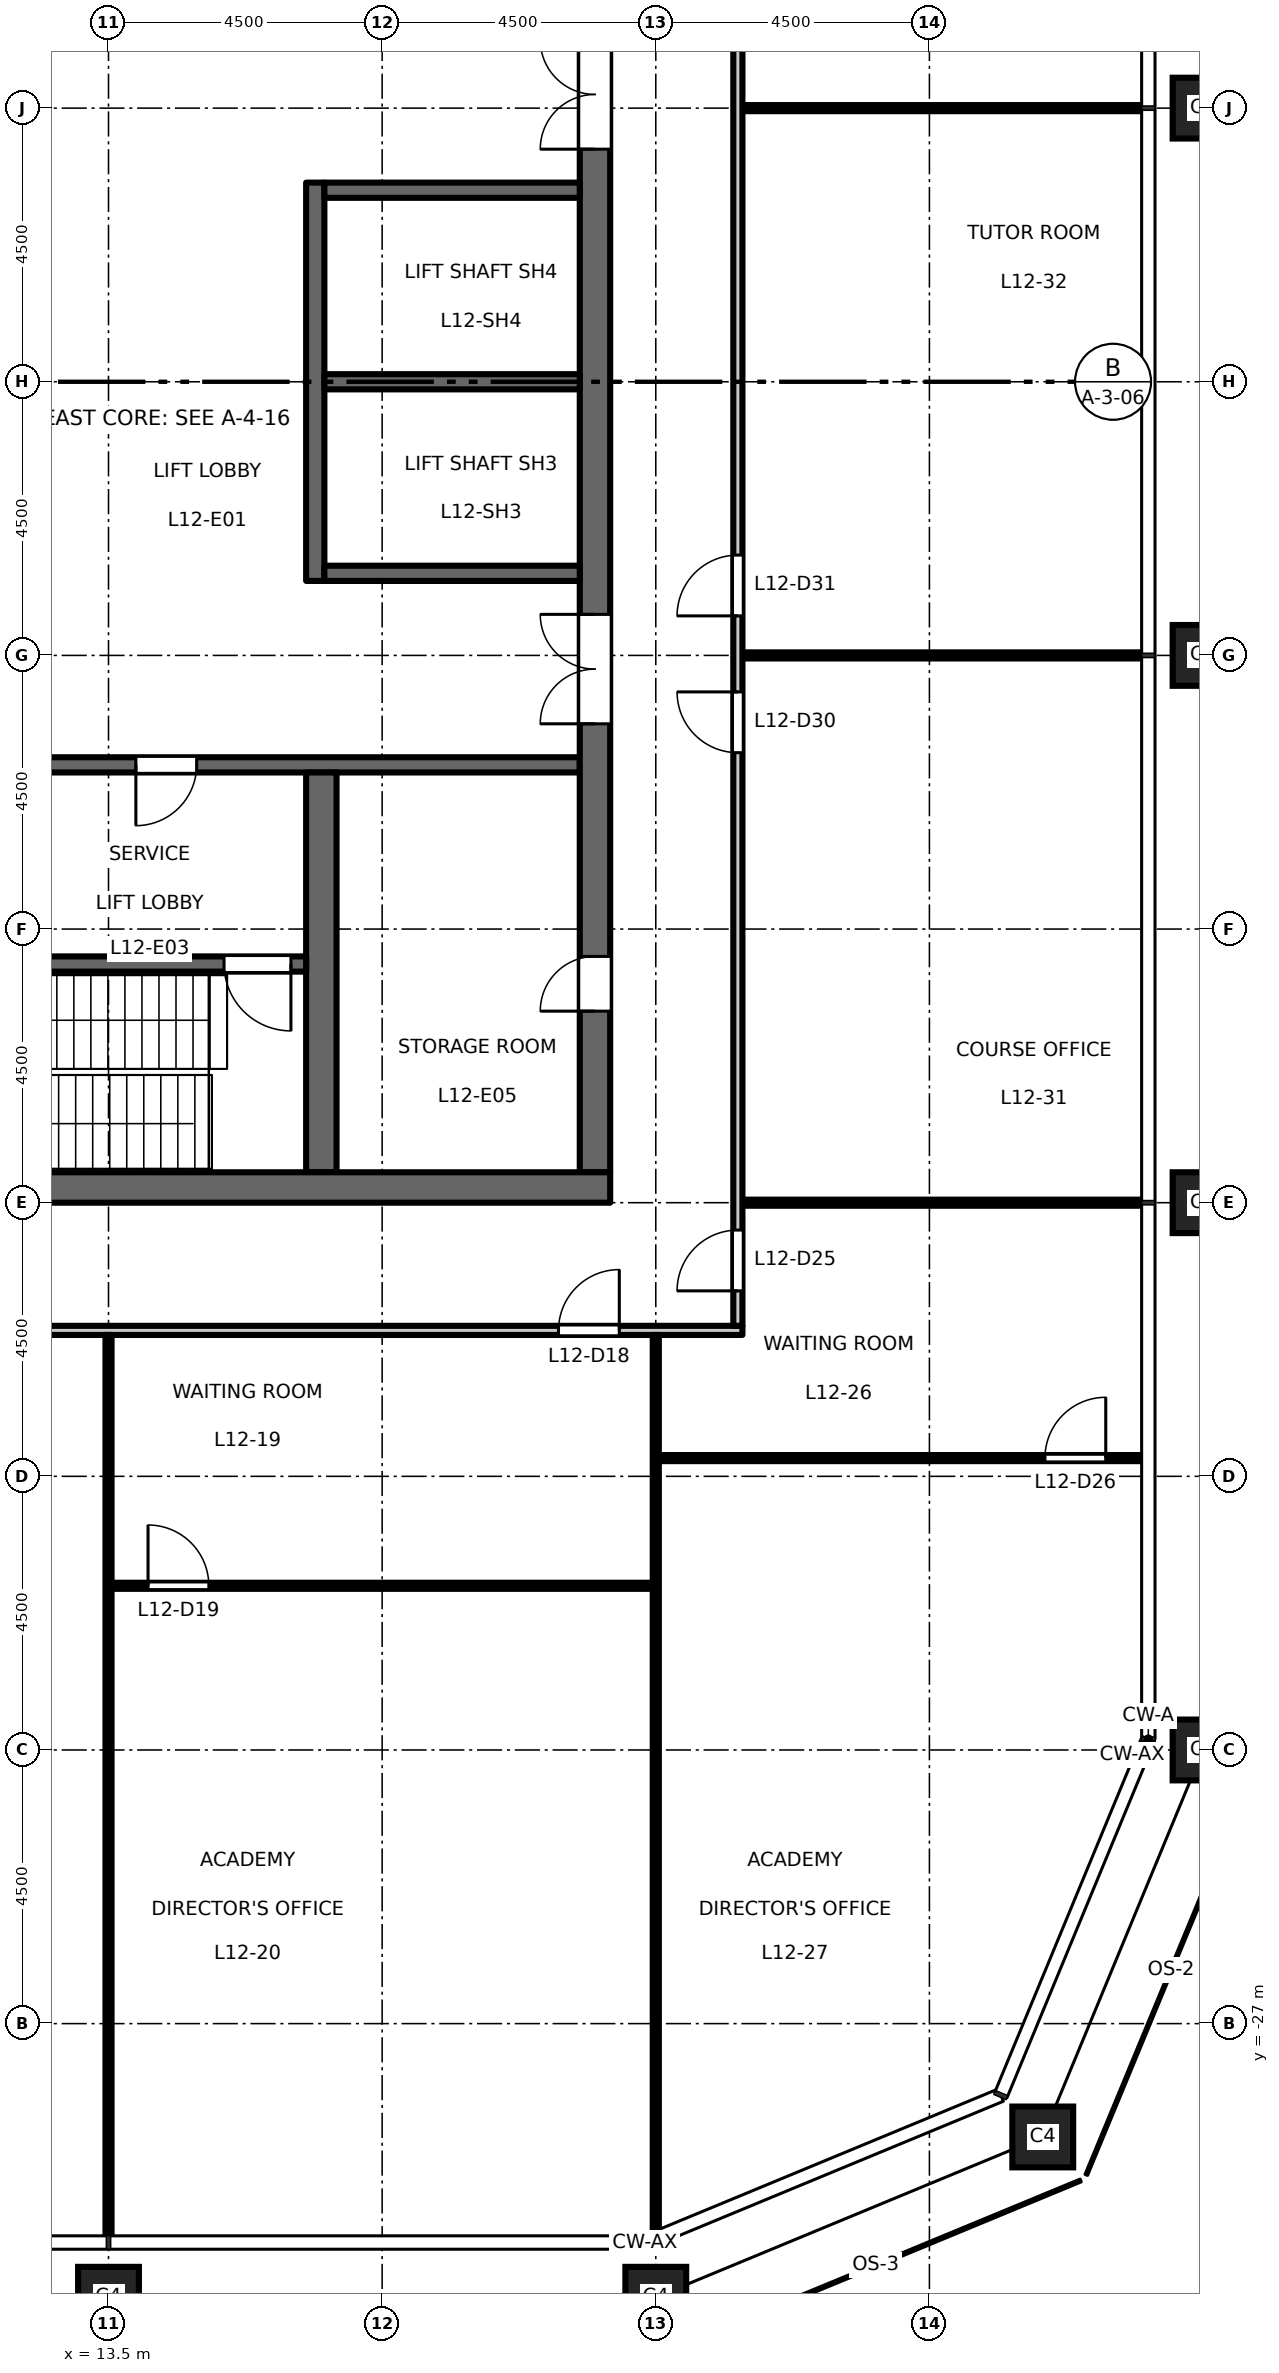
"""IFC4 building model, lengths in metres.
Left out: names, types, materials, properties, quantities, classifications, styles, units other than length and angle.
Written with IfcOpenShell. Run it as: python <this file> out.ifc"""

import sys

from ifc_helpers import new_model, si_unit, direction, frame, frame_2d, origin, origin_2d, place, context, subcontext, project, spatial, rectangle, hollow_rectangle, extrude, element, fill, save


model = new_model("IFC4")
c1 = context("Model", 3, precision=1e-05, world=origin(), true_north=direction((0.0, 1.0)))
c2 = subcontext(c1, "Body", "Model", "MODEL_VIEW")
j1 = project(units=[si_unit("LENGTHUNIT", "METRE"), si_unit("PLANEANGLEUNIT", "RADIAN")], contexts=[c1])
p1 = place(None, origin())
s1 = spatial("IfcSite", under=j1, at=p1, CompositionType="ELEMENT")
p2 = place(p1, origin())
s2 = spatial("IfcBuilding", under=s1, at=p2, CompositionType="ELEMENT")
p3 = place(p2, frame((0.0, 0.0, 58.2)))
s3 = spatial("IfcBuildingStorey", under=s2, at=p3, CompositionType="ELEMENT", Elevation=58.2)
for number, where, z_axis, x_axis in (
    (1, (13.5, -31.5, 0.0), (0.0, 0.0, 1.0), (1.0, 0.0, 0.0)),
    (2, (22.5, -31.5, 0.0), (0.0, 0.0, 1.0), (1.0, 0.0, 0.0)),
    (3, (28.864, -28.864, 0.0), (0.0, 0.0, 1.0), (1.0, 0.0, 0.0)),
    (4, (31.5, -22.5, 0.0), (0.0, 0.0, 1.0), (1.0, 0.0, 0.0)),
    (5, (31.5, -13.5, 0.0), (0.0, 0.0, 1.0), (1.0, 0.0, 0.0)),
    (6, (31.5, -4.5, 0.0), (0.0, 0.0, 1.0), (1.0, 0.0, 0.0)),
    (7, (31.5, 4.5, 0.0), (0.0, 0.0, 1.0), (1.0, 0.0, 0.0)),
):
    element("IfcColumn", number, at=place(p3, frame(where, z_axis=z_axis, x_axis=x_axis)), inside=s3, PredefinedType="COLUMN", context=c2, shape_type="SweptSolid", body=[
        extrude(hollow_rectangle(XDim=1.0, YDim=1.0, WallThickness=0.06, at=origin_2d()), origin(), (0.0, 0.0, 1.0), 4.5),
    ])
p4 = place(p3, frame((12.15, -6.3, 0.0), z_axis=(0.0, 0.0, 1.0), x_axis=(1.0, 0.0, 0.0)))
e8 = element("IfcWall", 8, at=p4, inside=s3, PredefinedType="SHEAR", context=c2, shape_type="SweptSolid", body=[
    extrude(rectangle(XDim=9.1, YDim=0.25, at=frame_2d((4.55, 0.0))), origin(), (0.0, 0.0, 1.0), 4.35),
])
p5 = place(p4, frame((1.8, 0.0, 0.0)))
e9 = element("IfcOpeningElement", 9, at=p5, cuts=e8, PredefinedType="OPENING", context=c2, shape_type="SweptSolid", body=[
    extrude(rectangle(XDim=1.0, YDim=2.1, at=frame_2d((0.5, 1.05))), frame((0.0, 0.135, 0.0), z_axis=(0.0, -1.0, 0.0), x_axis=(1.0, 0.0, 0.0)), (0.0, 0.0, 1.0), 0.27),
])
p6 = place(p3, frame((21.5, -13.0, 0.0), z_axis=(0.0, 0.0, 1.0), x_axis=(0.0, 1.0, 0.0)))
e10 = element("IfcWall", 10, at=p6, inside=s3, PredefinedType="SHEAR", context=c2, shape_type="SweptSolid", body=[
    extrude(rectangle(XDim=26.0, YDim=0.5, at=frame_2d((13.0, 0.0))), origin(), (0.0, 0.0, 1.0), 4.35),
])
p7 = place(p6, frame((16.825, 0.0, 0.0)))
e11 = element("IfcOpeningElement", 11, at=p7, cuts=e10, PredefinedType="OPENING", context=c2, shape_type="SweptSolid", body=[
    extrude(rectangle(XDim=1.8, YDim=2.1, at=frame_2d((0.9, 1.05))), frame((0.0, 0.26, 0.0), z_axis=(0.0, -1.0, 0.0), x_axis=(1.0, 0.0, 0.0)), (0.0, 0.0, 1.0), 0.52),
])
p8 = place(p6, frame((7.375, 0.0, 0.0)))
e12 = element("IfcOpeningElement", 12, at=p8, cuts=e10, PredefinedType="OPENING", context=c2, shape_type="SweptSolid", body=[
    extrude(rectangle(XDim=1.8, YDim=2.1, at=frame_2d((0.9, 1.05))), frame((0.0, 0.26, 0.0), z_axis=(0.0, -1.0, 0.0), x_axis=(1.0, 0.0, 0.0)), (0.0, 0.0, 1.0), 0.52),
])
p9 = place(p6, frame((2.65, 0.0, 0.0)))
e13 = element("IfcOpeningElement", 13, at=p9, cuts=e10, PredefinedType="OPENING", context=c2, shape_type="SweptSolid", body=[
    extrude(rectangle(XDim=0.9, YDim=2.1, at=frame_2d((0.45, 1.05))), frame((0.0, 0.26, 0.0), z_axis=(0.0, -1.0, 0.0), x_axis=(1.0, 0.0, 0.0)), (0.0, 0.0, 1.0), 0.52),
])
p10 = place(p3, frame((16.9, -3.275, 0.0), z_axis=(0.0, 0.0, 1.0), x_axis=(0.0, 1.0, 0.0)))
e14 = element("IfcWall", 14, at=p10, inside=s3, PredefinedType="SHEAR", context=c2, shape_type="SweptSolid", body=[
    extrude(rectangle(XDim=6.55, YDim=0.3, at=frame_2d((3.275, 0.0))), origin(), (0.0, 0.0, 1.0), 4.35),
])
for number, where, z_axis, x_axis in (
    (15, (17.05, 0.0, 0.0), (0.0, 0.0, 1.0), (1.0, 0.0, 0.0)),
    (16, (17.05, 3.15, 0.0), (0.0, 0.0, 1.0), (1.0, 0.0, 0.0)),
    (17, (17.05, -3.15, 0.0), (0.0, 0.0, 1.0), (1.0, 0.0, 0.0)),
):
    element("IfcWall", number, at=place(p3, frame(where, z_axis=z_axis, x_axis=x_axis)), inside=s3, PredefinedType="SHEAR", context=c2, shape_type="SweptSolid", body=[
        extrude(rectangle(XDim=4.2, YDim=0.25, at=frame_2d((2.1, 0.0))), origin(), (0.0, 0.0, 1.0), 4.35),
    ])
p11 = place(p3, frame((17.0, -13.0, 0.0), z_axis=(0.0, 0.0, 1.0), x_axis=(0.0, 1.0, 0.0)))
e18 = element("IfcWall", 18, at=p11, inside=s3, PredefinedType="SHEAR", context=c2, shape_type="SweptSolid", body=[
    extrude(rectangle(XDim=6.575, YDim=0.5, at=frame_2d((3.288, 0.0))), origin(), (0.0, 0.0, 1.0), 4.35),
])
p12 = place(p3, frame((8.75, -9.575, 0.0), z_axis=(0.0, 0.0, 1.0), x_axis=(1.0, 0.0, 0.0)))
e19 = element("IfcWall", 19, at=p12, inside=s3, PredefinedType="SHEAR", context=c2, shape_type="SweptSolid", body=[
    extrude(rectangle(XDim=8.0, YDim=0.25, at=frame_2d((4.0, 0.0))), origin(), (0.0, 0.0, 1.0), 4.35),
])
p13 = place(p12, frame((6.65, 0.0, 0.0)))
e20 = element("IfcOpeningElement", 20, at=p13, cuts=e19, PredefinedType="OPENING", context=c2, shape_type="SweptSolid", body=[
    extrude(rectangle(XDim=1.1, YDim=2.1, at=frame_2d((0.55, 1.05))), frame((0.0, 0.135, 0.0), z_axis=(0.0, -1.0, 0.0), x_axis=(1.0, 0.0, 0.0)), (0.0, 0.0, 1.0), 0.27),
])
p14 = place(p3, frame((8.25, -13.25, 0.0), z_axis=(0.0, 0.0, 1.0), x_axis=(1.0, 0.0, 0.0)))
e21 = element("IfcWall", 21, at=p14, inside=s3, PredefinedType="SHEAR", context=c2, shape_type="SweptSolid", body=[
    extrude(rectangle(XDim=13.5, YDim=0.5, at=frame_2d((6.75, 0.0))), origin(), (0.0, 0.0, 1.0), 4.35),
])
p15 = place(p3, frame((13.55, -19.8, 0.0), z_axis=(0.0, 0.0, 1.0), x_axis=(1.0, 0.0, 0.0)))
e22 = element("IfcWall", 22, at=p15, inside=s3, PredefinedType="PARTITIONING", context=c2, shape_type="SweptSolid", body=[
    extrude(rectangle(XDim=8.9, YDim=0.1, at=frame_2d((4.45, 0.0))), origin(), (0.0, 0.0, 1.0), 4.35),
])
p16 = place(p15, frame((0.6, 0.0, 0.0)))
e23 = element("IfcOpeningElement", 23, at=p16, cuts=e22, PredefinedType="OPENING", context=c2, shape_type="SweptSolid", body=[
    extrude(rectangle(XDim=1.0, YDim=2.1, at=frame_2d((0.5, 1.05))), frame((0.0, 0.06, 0.0), z_axis=(0.0, -1.0, 0.0), x_axis=(1.0, 0.0, 0.0)), (0.0, 0.0, 1.0), 0.12),
])
p17 = place(p3, frame((22.55, -17.7, 0.0), z_axis=(0.0, 0.0, 1.0), x_axis=(1.0, 0.0, 0.0)))
e24 = element("IfcWall", 24, at=p17, inside=s3, PredefinedType="PARTITIONING", context=c2, shape_type="SweptSolid", body=[
    extrude(rectangle(XDim=7.96, YDim=0.1, at=frame_2d((3.98, 0.0))), origin(), (0.0, 0.0, 1.0), 4.35),
])
p18 = place(p17, frame((6.35, 0.0, 0.0)))
e25 = element("IfcOpeningElement", 25, at=p18, cuts=e24, PredefinedType="OPENING", context=c2, shape_type="SweptSolid", body=[
    extrude(rectangle(XDim=1.0, YDim=2.1, at=frame_2d((0.5, 1.05))), frame((0.0, 0.06, 0.0), z_axis=(0.0, -1.0, 0.0), x_axis=(1.0, 0.0, 0.0)), (0.0, 0.0, 1.0), 0.12),
])
p19 = place(p3, frame((-23.925, -15.6, 0.0), z_axis=(0.0, 0.0, 1.0), x_axis=(1.0, 0.0, 0.0)))
e26 = element("IfcWall", 26, at=p19, inside=s3, PredefinedType="PARTITIONING", context=c2, shape_type="SweptSolid", body=[
    extrude(rectangle(XDim=47.85, YDim=0.15, at=frame_2d((23.925, 0.0))), origin(), (0.0, 0.0, 1.0), 4.35),
])
p20 = place(p19, frame((8.825, 0.0, 0.0)))
e27 = element("IfcOpeningElement", 27, at=p20, cuts=e26, PredefinedType="OPENING", context=c2, shape_type="SweptSolid", body=[
    extrude(rectangle(XDim=1.0, YDim=2.1, at=frame_2d((0.5, 1.05))), frame((0.0, 0.085, 0.0), z_axis=(0.0, -1.0, 0.0), x_axis=(1.0, 0.0, 0.0)), (0.0, 0.0, 1.0), 0.17),
])
p21 = place(p19, frame((17.825, 0.0, 0.0)))
e28 = element("IfcOpeningElement", 28, at=p21, cuts=e26, PredefinedType="OPENING", context=c2, shape_type="SweptSolid", body=[
    extrude(rectangle(XDim=1.0, YDim=2.1, at=frame_2d((0.5, 1.05))), frame((0.0, 0.085, 0.0), z_axis=(0.0, -1.0, 0.0), x_axis=(1.0, 0.0, 0.0)), (0.0, 0.0, 1.0), 0.17),
])
p22 = place(p19, frame((26.825, 0.0, 0.0)))
e29 = element("IfcOpeningElement", 29, at=p22, cuts=e26, PredefinedType="OPENING", context=c2, shape_type="SweptSolid", body=[
    extrude(rectangle(XDim=1.0, YDim=2.1, at=frame_2d((0.5, 1.05))), frame((0.0, 0.085, 0.0), z_axis=(0.0, -1.0, 0.0), x_axis=(1.0, 0.0, 0.0)), (0.0, 0.0, 1.0), 0.17),
])
p23 = place(p19, frame((29.075, 0.0, 0.0)))
e30 = element("IfcOpeningElement", 30, at=p23, cuts=e26, PredefinedType="OPENING", context=c2, shape_type="SweptSolid", body=[
    extrude(rectangle(XDim=1.0, YDim=2.1, at=frame_2d((0.5, 1.05))), frame((0.0, 0.085, 0.0), z_axis=(0.0, -1.0, 0.0), x_axis=(1.0, 0.0, 0.0)), (0.0, 0.0, 1.0), 0.17),
])
p24 = place(p19, frame((44.825, 0.0, 0.0)))
e31 = element("IfcOpeningElement", 31, at=p24, cuts=e26, PredefinedType="OPENING", context=c2, shape_type="SweptSolid", body=[
    extrude(rectangle(XDim=1.0, YDim=2.1, at=frame_2d((0.5, 1.05))), frame((0.0, 0.085, 0.0), z_axis=(0.0, -1.0, 0.0), x_axis=(1.0, 0.0, 0.0)), (0.0, 0.0, 1.0), 0.17),
])
p25 = place(p3, frame((23.925, -13.5, 0.0), z_axis=(0.0, 0.0, 1.0), x_axis=(1.0, 0.0, 0.0)))
e32 = element("IfcWall", 32, at=p25, inside=s3, PredefinedType="PARTITIONING", context=c2, shape_type="SweptSolid", body=[
    extrude(rectangle(XDim=6.585, YDim=0.1, at=frame_2d((3.292, 0.0))), origin(), (0.0, 0.0, 1.0), 3.35),
])
for number, where, z_axis, x_axis in (
    (33, (23.925, -4.5, 0.0), (0.0, 0.0, 1.0), (1.0, 0.0, 0.0)),
    (34, (23.925, 4.5, 0.0), (0.0, 0.0, 1.0), (1.0, 0.0, 0.0)),
):
    element("IfcWall", number, at=place(p3, frame(where, z_axis=z_axis, x_axis=x_axis)), inside=s3, PredefinedType="PARTITIONING", context=c2, shape_type="SweptSolid", body=[
        extrude(rectangle(XDim=6.585, YDim=0.1, at=frame_2d((3.292, 0.0))), origin(), (0.0, 0.0, 1.0), 4.35),
    ])
p26 = place(p3, frame((13.5, -30.51, 0.0), z_axis=(0.0, 0.0, 1.0), x_axis=(0.0, 1.0, 0.0)))
e35 = element("IfcWall", 35, at=p26, inside=s3, PredefinedType="PARTITIONING", context=c2, shape_type="SweptSolid", body=[
    extrude(rectangle(XDim=14.835, YDim=0.1, at=frame_2d((7.417, 0.0))), origin(), (0.0, 0.0, 1.0), 3.35),
])
p27 = place(p3, frame((22.5, -30.428, 0.0), z_axis=(0.0, 0.0, 1.0), x_axis=(0.0, 1.0, 0.0)))
e36 = element("IfcWall", 36, at=p27, inside=s3, PredefinedType="PARTITIONING", context=c2, shape_type="SweptSolid", body=[
    extrude(rectangle(XDim=14.753, YDim=0.1, at=frame_2d((7.376, 0.0))), origin(), (0.0, 0.0, 1.0), 3.35),
])
p28 = place(p3, frame((23.85, -15.525, 0.0), z_axis=(0.0, 0.0, 1.0), x_axis=(0.0, 1.0, 0.0)))
e37 = element("IfcWall", 37, at=p28, inside=s3, PredefinedType="PARTITIONING", context=c2, shape_type="SweptSolid", body=[
    extrude(rectangle(XDim=31.05, YDim=0.15, at=frame_2d((15.525, 0.0))), origin(), (0.0, 0.0, 1.0), 4.35),
])
p29 = place(p28, frame((29.675, 0.0, 0.0)))
e38 = element("IfcOpeningElement", 38, at=p29, cuts=e37, PredefinedType="OPENING", context=c2, shape_type="SweptSolid", body=[
    extrude(rectangle(XDim=1.0, YDim=2.1, at=frame_2d((0.5, 1.05))), frame((0.0, 0.085, 0.0), z_axis=(0.0, -1.0, 0.0), x_axis=(1.0, 0.0, 0.0)), (0.0, 0.0, 1.0), 0.17),
])
p30 = place(p28, frame((0.575, 0.0, 0.0)))
e39 = element("IfcOpeningElement", 39, at=p30, cuts=e37, PredefinedType="OPENING", context=c2, shape_type="SweptSolid", body=[
    extrude(rectangle(XDim=1.0, YDim=2.1, at=frame_2d((0.5, 1.05))), frame((0.0, 0.085, 0.0), z_axis=(0.0, -1.0, 0.0), x_axis=(1.0, 0.0, 0.0)), (0.0, 0.0, 1.0), 0.17),
])
p31 = place(p28, frame((9.425, 0.0, 0.0)))
e40 = element("IfcOpeningElement", 40, at=p31, cuts=e37, PredefinedType="OPENING", context=c2, shape_type="SweptSolid", body=[
    extrude(rectangle(XDim=1.0, YDim=2.1, at=frame_2d((0.5, 1.05))), frame((0.0, 0.085, 0.0), z_axis=(0.0, -1.0, 0.0), x_axis=(1.0, 0.0, 0.0)), (0.0, 0.0, 1.0), 0.17),
])
p32 = place(p28, frame((11.675, 0.0, 0.0)))
e41 = element("IfcOpeningElement", 41, at=p32, cuts=e37, PredefinedType="OPENING", context=c2, shape_type="SweptSolid", body=[
    extrude(rectangle(XDim=1.0, YDim=2.1, at=frame_2d((0.5, 1.05))), frame((0.0, 0.085, 0.0), z_axis=(0.0, -1.0, 0.0), x_axis=(1.0, 0.0, 0.0)), (0.0, 0.0, 1.0), 0.17),
])
p33 = place(p28, frame((27.425, 0.0, 0.0)))
e42 = element("IfcOpeningElement", 42, at=p33, cuts=e37, PredefinedType="OPENING", context=c2, shape_type="SweptSolid", body=[
    extrude(rectangle(XDim=1.0, YDim=2.1, at=frame_2d((0.5, 1.05))), frame((0.0, 0.085, 0.0), z_axis=(0.0, -1.0, 0.0), x_axis=(1.0, 0.0, 0.0)), (0.0, 0.0, 1.0), 0.17),
])
p34 = place(p5, origin())
e43 = element("IfcDoor", 43, at=p34, inside=s3, OperationType="SINGLE_SWING_LEFT", PredefinedType="DOOR", context=c2, shape_type="SweptSolid", body=[
    extrude(rectangle(XDim=1.0, YDim=2.1, at=frame_2d((0.5, 1.05))), frame((0.0, 0.025, 0.0), z_axis=(0.0, -1.0, 0.0), x_axis=(1.0, 0.0, 0.0)), (0.0, 0.0, 1.0), 0.05),
])
fill(e9, e43)
p35 = place(p13, origin())
e44 = element("IfcDoor", 44, at=p35, inside=s3, OperationType="SINGLE_SWING_RIGHT", PredefinedType="DOOR", context=c2, shape_type="SweptSolid", body=[
    extrude(rectangle(XDim=1.1, YDim=2.1, at=frame_2d((0.55, 1.05))), frame((0.0, 0.025, 0.0), z_axis=(0.0, -1.0, 0.0), x_axis=(1.0, 0.0, 0.0)), (0.0, 0.0, 1.0), 0.05),
])
fill(e20, e44)
p36 = place(p7, origin())
e45 = element("IfcDoor", 45, at=p36, inside=s3, OperationType="DOUBLE_DOOR_DOUBLE_SWING", PredefinedType="DOOR", context=c2, shape_type="SweptSolid", body=[
    extrude(rectangle(XDim=1.8, YDim=2.1, at=frame_2d((0.9, 1.05))), frame((0.0, 0.025, 0.0), z_axis=(0.0, -1.0, 0.0), x_axis=(1.0, 0.0, 0.0)), (0.0, 0.0, 1.0), 0.05),
])
fill(e11, e45)
p37 = place(p8, origin())
e46 = element("IfcDoor", 46, at=p37, inside=s3, OperationType="DOUBLE_DOOR_DOUBLE_SWING", PredefinedType="DOOR", context=c2, shape_type="SweptSolid", body=[
    extrude(rectangle(XDim=1.8, YDim=2.1, at=frame_2d((0.9, 1.05))), frame((0.0, 0.025, 0.0), z_axis=(0.0, -1.0, 0.0), x_axis=(1.0, 0.0, 0.0)), (0.0, 0.0, 1.0), 0.05),
])
fill(e12, e46)
p38 = place(p9, origin())
e47 = element("IfcDoor", 47, at=p38, inside=s3, OperationType="SINGLE_SWING_RIGHT", PredefinedType="DOOR", context=c2, shape_type="SweptSolid", body=[
    extrude(rectangle(XDim=0.9, YDim=2.1, at=frame_2d((0.45, 1.05))), frame((0.0, 0.025, 0.0), z_axis=(0.0, -1.0, 0.0), x_axis=(1.0, 0.0, 0.0)), (0.0, 0.0, 1.0), 0.05),
])
fill(e13, e47)
p39 = place(p24, origin())
e48 = element("IfcDoor", 48, at=p39, inside=s3, OperationType="SINGLE_SWING_RIGHT", PredefinedType="DOOR", context=c2, shape_type="SweptSolid", body=[
    extrude(rectangle(XDim=1.0, YDim=2.1, at=frame_2d((0.5, 1.05))), frame((0.0, 0.025, 0.0), z_axis=(0.0, -1.0, 0.0), x_axis=(1.0, 0.0, 0.0)), (0.0, 0.0, 1.0), 0.05),
])
fill(e31, e48)
p40 = place(p16, origin())
e49 = element("IfcDoor", 49, at=p40, inside=s3, OperationType="SINGLE_SWING_LEFT", PredefinedType="DOOR", context=c2, shape_type="SweptSolid", body=[
    extrude(rectangle(XDim=1.0, YDim=2.1, at=frame_2d((0.5, 1.05))), frame((0.0, 0.025, 0.0), z_axis=(0.0, -1.0, 0.0), x_axis=(1.0, 0.0, 0.0)), (0.0, 0.0, 1.0), 0.05),
])
fill(e23, e49)
p41 = place(p30, origin())
e50 = element("IfcDoor", 50, at=p41, inside=s3, OperationType="SINGLE_SWING_LEFT", PredefinedType="DOOR", context=c2, shape_type="SweptSolid", body=[
    extrude(rectangle(XDim=1.0, YDim=2.1, at=frame_2d((0.5, 1.05))), frame((0.0, 0.025, 0.0), z_axis=(0.0, -1.0, 0.0), x_axis=(1.0, 0.0, 0.0)), (0.0, 0.0, 1.0), 0.05),
])
fill(e39, e50)
p42 = place(p18, origin())
e51 = element("IfcDoor", 51, at=p42, inside=s3, OperationType="SINGLE_SWING_RIGHT", PredefinedType="DOOR", context=c2, shape_type="SweptSolid", body=[
    extrude(rectangle(XDim=1.0, YDim=2.1, at=frame_2d((0.5, 1.05))), frame((0.0, 0.025, 0.0), z_axis=(0.0, -1.0, 0.0), x_axis=(1.0, 0.0, 0.0)), (0.0, 0.0, 1.0), 0.05),
])
fill(e25, e51)
p43 = place(p31, origin())
e52 = element("IfcDoor", 52, at=p43, inside=s3, OperationType="SINGLE_SWING_RIGHT", PredefinedType="DOOR", context=c2, shape_type="SweptSolid", body=[
    extrude(rectangle(XDim=1.0, YDim=2.1, at=frame_2d((0.5, 1.05))), frame((0.0, 0.025, 0.0), z_axis=(0.0, -1.0, 0.0), x_axis=(1.0, 0.0, 0.0)), (0.0, 0.0, 1.0), 0.05),
])
fill(e40, e52)
p44 = place(p32, origin())
e53 = element("IfcDoor", 53, at=p44, inside=s3, OperationType="SINGLE_SWING_LEFT", PredefinedType="DOOR", context=c2, shape_type="SweptSolid", body=[
    extrude(rectangle(XDim=1.0, YDim=2.1, at=frame_2d((0.5, 1.05))), frame((0.0, 0.025, 0.0), z_axis=(0.0, -1.0, 0.0), x_axis=(1.0, 0.0, 0.0)), (0.0, 0.0, 1.0), 0.05),
])
fill(e41, e53)
save(model, sys.argv[1])
